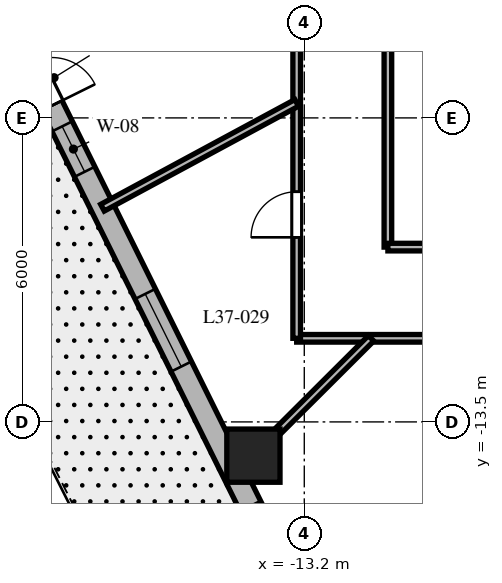
"""IFC4 building model, lengths in metres.
Left out: names, types, materials, properties, quantities, classifications, styles, units other than length and angle.
Written with IfcOpenShell. Run it as: python <this file> out.ifc"""

import sys

from ifc_helpers import new_model, si_unit, direction, frame, frame_2d, origin, origin_2d, place, context, subcontext, project, spatial, rectangle, extrude, element, fill, save


model = new_model("IFC4")
c1 = context("Model", 3, precision=1e-05, world=origin(), true_north=direction((0.0, 1.0)))
c2 = subcontext(c1, "Body", "Model", "MODEL_VIEW")
j1 = project(units=[si_unit("LENGTHUNIT", "METRE"), si_unit("PLANEANGLEUNIT", "RADIAN")], contexts=[c1])
p1 = place(None, origin())
s1 = spatial("IfcSite", under=j1, at=p1, CompositionType="ELEMENT")
p2 = place(p1, origin())
s2 = spatial("IfcBuilding", under=s1, at=p2, CompositionType="ELEMENT")
p3 = place(p2, frame((0.0, 0.0, 151.7)))
s3 = spatial("IfcBuildingStorey", under=s2, at=p3, CompositionType="ELEMENT", Elevation=151.7)
p4 = place(p3, frame((-14.204, -14.166, 0.0), z_axis=(0.0, 0.0, 1.0), x_axis=(1.0, 0.0, 0.0)))
e1 = element("IfcColumn", 1, at=p4, inside=s3, PredefinedType="COLUMN", context=c2, shape_type="SweptSolid", body=[
    extrude(rectangle(XDim=1.05, YDim=1.05, at=origin_2d()), origin(), (0.0, 0.0, 1.0), 3.7),
])
p5 = place(p3, frame((-20.618, -2.344, 0.0), z_axis=(0.0, 0.0, 1.0), x_axis=(0.444243691097, -0.895905990002, 0.0)))
e2 = element("IfcWall", 2, at=p5, inside=s3, PredefinedType="SOLIDWALL", context=c2, shape_type="SweptSolid", body=[
    extrude(rectangle(XDim=16.784, YDim=0.45, at=frame_2d((8.392, 0.0))), origin(), (0.0, 0.0, 1.0), 3.4),
])
p6 = place(p5, frame((4.535, 0.0, 0.0)))
e3 = element("IfcOpeningElement", 3, at=p6, cuts=e2, PredefinedType="OPENING", context=c2, shape_type="SweptSolid", body=[
    extrude(rectangle(XDim=0.95, YDim=2.15, at=frame_2d((0.475, 1.075))), frame((0.0, 0.235, 0.0), z_axis=(0.0, -1.0, 0.0), x_axis=(1.0, 0.0, 0.0)), (0.0, 0.0, 1.0), 0.47),
])
p7 = place(p5, frame((0.931, 0.0, 0.8)))
e4 = element("IfcOpeningElement", 4, at=p7, cuts=e2, PredefinedType="OPENING", context=c2, shape_type="SweptSolid", body=[
    extrude(rectangle(XDim=1.6, YDim=1.75, at=frame_2d((0.8, 0.875))), frame((0.0, 0.235, 0.0), z_axis=(0.0, -1.0, 0.0), x_axis=(1.0, 0.0, 0.0)), (0.0, 0.0, 1.0), 0.47),
])
p8 = place(p5, frame((5.942, 0.0, 0.8)))
e5 = element("IfcOpeningElement", 5, at=p8, cuts=e2, PredefinedType="OPENING", context=c2, shape_type="SweptSolid", body=[
    extrude(rectangle(XDim=1.0, YDim=1.65, at=frame_2d((0.5, 0.825))), frame((0.0, 0.235, 0.0), z_axis=(0.0, -1.0, 0.0), x_axis=(1.0, 0.0, 0.0)), (0.0, 0.0, 1.0), 0.47),
])
p9 = place(p5, frame((9.633, 0.0, 0.8)))
e6 = element("IfcOpeningElement", 6, at=p9, cuts=e2, PredefinedType="OPENING", context=c2, shape_type="SweptSolid", body=[
    extrude(rectangle(XDim=1.6, YDim=1.75, at=frame_2d((0.8, 0.875))), frame((0.0, 0.235, 0.0), z_axis=(0.0, -1.0, 0.0), x_axis=(1.0, 0.0, 0.0)), (0.0, 0.0, 1.0), 0.47),
])
p10 = place(p5, frame((14.303, 0.0, 0.8)))
e7 = element("IfcOpeningElement", 7, at=p10, cuts=e2, PredefinedType="OPENING", context=c2, shape_type="SweptSolid", body=[
    extrude(rectangle(XDim=1.6, YDim=1.75, at=frame_2d((0.8, 0.875))), frame((0.0, 0.235, 0.0), z_axis=(0.0, -1.0, 0.0), x_axis=(1.0, 0.0, 0.0)), (0.0, 0.0, 1.0), 0.47),
])
p11 = place(p3, frame((13.35, -11.85, 0.0), z_axis=(0.0, 0.0, 1.0), x_axis=(-1.0, 0.0, 0.0)))
e8 = element("IfcWall", 8, at=p11, inside=s3, PredefinedType="PARTITIONING", context=c2, shape_type="SweptSolid", body=[
    extrude(rectangle(XDim=26.7, YDim=0.15, at=frame_2d((13.35, 0.0))), origin(), (0.0, 0.0, 1.0), 2.84),
])
p12 = place(p11, frame((20.682, 0.0, 0.0)))
e9 = element("IfcOpeningElement", 9, at=p12, cuts=e8, PredefinedType="OPENING", context=c2, shape_type="SweptSolid", body=[
    extrude(rectangle(XDim=0.95, YDim=2.03, at=frame_2d((0.475, 1.015))), frame((0.0, 0.085, 0.0), z_axis=(0.0, -1.0, 0.0), x_axis=(1.0, 0.0, 0.0)), (0.0, 0.0, 1.0), 0.17),
])
p13 = place(p11, frame((12.362, 0.0, 0.0)))
e10 = element("IfcOpeningElement", 10, at=p13, cuts=e8, PredefinedType="OPENING", context=c2, shape_type="SweptSolid", body=[
    extrude(rectangle(XDim=0.95, YDim=2.03, at=frame_2d((0.475, 1.015))), frame((0.0, 0.085, 0.0), z_axis=(0.0, -1.0, 0.0), x_axis=(1.0, 0.0, 0.0)), (0.0, 0.0, 1.0), 0.17),
])
p14 = place(p11, frame((3.995, 0.0, 0.0)))
e11 = element("IfcOpeningElement", 11, at=p14, cuts=e8, PredefinedType="OPENING", context=c2, shape_type="SweptSolid", body=[
    extrude(rectangle(XDim=0.95, YDim=2.03, at=frame_2d((0.475, 1.015))), frame((0.0, 0.085, 0.0), z_axis=(0.0, -1.0, 0.0), x_axis=(1.0, 0.0, 0.0)), (0.0, 0.0, 1.0), 0.17),
])
p15 = place(p3, frame((-13.35, -11.85, 0.0), z_axis=(0.0, 0.0, 1.0), x_axis=(0.0, 1.0, 0.0)))
e12 = element("IfcWall", 12, at=p15, inside=s3, PredefinedType="PARTITIONING", context=c2, shape_type="SweptSolid", body=[
    extrude(rectangle(XDim=23.7, YDim=0.15, at=frame_2d((11.85, 0.0))), origin(), (0.0, 0.0, 1.0), 2.84),
])
p16 = place(p15, frame((18.389, 0.0, 0.0)))
e13 = element("IfcOpeningElement", 13, at=p16, cuts=e12, PredefinedType="OPENING", context=c2, shape_type="SweptSolid", body=[
    extrude(rectangle(XDim=0.95, YDim=2.03, at=frame_2d((0.475, 1.015))), frame((0.0, 0.085, 0.0), z_axis=(0.0, -1.0, 0.0), x_axis=(1.0, 0.0, 0.0)), (0.0, 0.0, 1.0), 0.17),
])
p17 = place(p15, frame((10.751, 0.0, 0.0)))
e14 = element("IfcOpeningElement", 14, at=p17, cuts=e12, PredefinedType="OPENING", context=c2, shape_type="SweptSolid", body=[
    extrude(rectangle(XDim=0.95, YDim=2.03, at=frame_2d((0.475, 1.015))), frame((0.0, 0.085, 0.0), z_axis=(0.0, -1.0, 0.0), x_axis=(1.0, 0.0, 0.0)), (0.0, 0.0, 1.0), 0.17),
])
p18 = place(p15, frame((5.951, 0.0, 0.0)))
e15 = element("IfcOpeningElement", 15, at=p18, cuts=e12, PredefinedType="OPENING", context=c2, shape_type="SweptSolid", body=[
    extrude(rectangle(XDim=0.9, YDim=2.03, at=frame_2d((0.45, 1.015))), frame((0.0, 0.085, 0.0), z_axis=(0.0, -1.0, 0.0), x_axis=(1.0, 0.0, 0.0)), (0.0, 0.0, 1.0), 0.17),
])
p19 = place(p15, frame((1.993, 0.0, 0.0)))
e16 = element("IfcOpeningElement", 16, at=p19, cuts=e12, PredefinedType="OPENING", context=c2, shape_type="SweptSolid", body=[
    extrude(rectangle(XDim=0.9, YDim=2.03, at=frame_2d((0.45, 1.015))), frame((0.0, 0.085, 0.0), z_axis=(0.0, -1.0, 0.0), x_axis=(1.0, 0.0, 0.0)), (0.0, 0.0, 1.0), 0.17),
])
p20 = place(p3, frame((-11.55, 2.7, 0.0), z_axis=(0.0, 0.0, 1.0), x_axis=(0.0, -1.0, 0.0)))
e17 = element("IfcWall", 17, at=p20, inside=s3, PredefinedType="PARTITIONING", context=c2, shape_type="SweptSolid", body=[
    extrude(rectangle(XDim=12.75, YDim=0.15, at=frame_2d((6.375, 0.0))), origin(), (0.0, 0.0, 1.0), 2.84),
])
p21 = place(p3, frame((-11.55, -10.05, 0.0), z_axis=(0.0, 0.0, 1.0), x_axis=(1.0, 0.0, 0.0)))
e18 = element("IfcWall", 18, at=p21, inside=s3, PredefinedType="PARTITIONING", context=c2, shape_type="SweptSolid", body=[
    extrude(rectangle(XDim=11.55, YDim=0.15, at=frame_2d((5.775, 0.0))), origin(), (0.0, 0.0, 1.0), 2.84),
])
p22 = place(p3, frame((-13.35, -7.204, 0.0), z_axis=(0.0, 0.0, 1.0), x_axis=(-0.880033329067, -0.474911928394, 0.0)))
e19 = element("IfcWall", 19, at=p22, inside=s3, PredefinedType="PARTITIONING", context=c2, shape_type="SweptSolid", body=[
    extrude(rectangle(XDim=4.355, YDim=0.15, at=frame_2d((2.178, 0.0))), origin(), (0.0, 0.0, 1.0), 2.64),
])
p23 = place(p3, frame((-11.882, -11.85, 0.0), z_axis=(0.0, 0.0, 1.0), x_axis=(-0.708037373639, -0.706174962407, 0.0)))
e20 = element("IfcWall", 20, at=p23, inside=s3, PredefinedType="PARTITIONING", context=c2, shape_type="SweptSolid", body=[
    extrude(rectangle(XDim=3.802, YDim=0.15, at=frame_2d((1.901, 0.0))), origin(), (0.0, 0.0, 1.0), 2.64),
])
p24 = place(p6, origin())
e21 = element("IfcDoor", 21, at=p24, inside=s3, OperationType="SINGLE_SWING_RIGHT", PredefinedType="DOOR", context=c2, shape_type="SweptSolid", body=[
    extrude(rectangle(XDim=0.95, YDim=2.15, at=frame_2d((0.475, 1.075))), frame((0.0, 0.025, 0.0), z_axis=(0.0, -1.0, 0.0), x_axis=(1.0, 0.0, 0.0)), (0.0, 0.0, 1.0), 0.05),
])
fill(e3, e21)
p25 = place(p8, origin())
e22 = element("IfcWindow", 22, at=p25, inside=s3, PartitioningType="SINGLE_PANEL", PredefinedType="WINDOW", context=c2, shape_type="SweptSolid", body=[
    extrude(rectangle(XDim=1.0, YDim=1.65, at=frame_2d((0.5, 0.825))), frame((0.0, 0.03, 0.0), z_axis=(0.0, -1.0, 0.0), x_axis=(1.0, 0.0, 0.0)), (0.0, 0.0, 1.0), 0.06),
])
fill(e5, e22)
p26 = place(p9, origin())
e23 = element("IfcWindow", 23, at=p26, inside=s3, PartitioningType="SINGLE_PANEL", PredefinedType="WINDOW", context=c2, shape_type="SweptSolid", body=[
    extrude(rectangle(XDim=1.6, YDim=1.75, at=frame_2d((0.8, 0.875))), frame((0.0, 0.03, 0.0), z_axis=(0.0, -1.0, 0.0), x_axis=(1.0, 0.0, 0.0)), (0.0, 0.0, 1.0), 0.06),
])
fill(e6, e23)
p27 = place(p19, origin())
e24 = element("IfcDoor", 24, at=p27, inside=s3, OperationType="SINGLE_SWING_LEFT", PredefinedType="DOOR", context=c2, shape_type="SweptSolid", body=[
    extrude(rectangle(XDim=0.9, YDim=2.03, at=frame_2d((0.45, 1.015))), frame((0.0, 0.025, 0.0), z_axis=(0.0, -1.0, 0.0), x_axis=(1.0, 0.0, 0.0)), (0.0, 0.0, 1.0), 0.05),
])
fill(e16, e24)
save(model, sys.argv[1])
